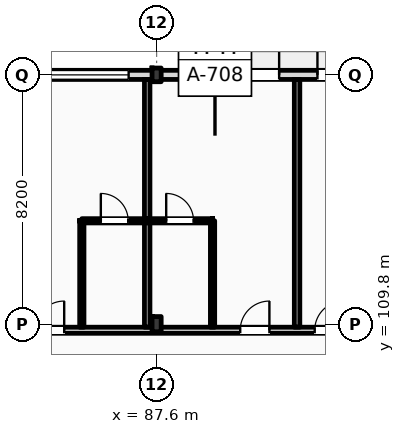
"""IFC4 building model, lengths in metres.
Left out: names, types, materials, properties, quantities, classifications, styles, units other than length and angle.
Written with IfcOpenShell. Run it as: python <this file> out.ifc"""

import sys

from ifc_helpers import new_model, si_unit, direction, frame, frame_2d, origin, origin_2d, place, context, subcontext, project, spatial, rectangle, i_section, extrude, element, fill, save


model = new_model("IFC4")
c1 = context("Model", 3, precision=1e-05, world=origin(), true_north=direction((0.0, 1.0)))
c2 = subcontext(c1, "Body", "Model", "MODEL_VIEW")
j1 = project(units=[si_unit("LENGTHUNIT", "METRE"), si_unit("PLANEANGLEUNIT", "RADIAN")], contexts=[c1])
p1 = place(None, origin())
s1 = spatial("IfcSite", under=j1, at=p1, CompositionType="ELEMENT")
p2 = place(p1, origin())
s2 = spatial("IfcBuilding", under=s1, at=p2, CompositionType="ELEMENT")
p3 = place(p2, frame((0.0, 0.0, 31.8)))
s3 = spatial("IfcBuildingStorey", under=s2, at=p3, CompositionType="ELEMENT", Elevation=31.8)
p4 = place(p3, frame((87.6, 109.8, 0.0), z_axis=(0.0, 0.0, 1.0), x_axis=(1.0, 0.0, 0.0)))
e1 = element("IfcColumn", 1, at=p4, inside=s3, PredefinedType="COLUMN", context=c2, shape_type="SweptSolid", body=[
    extrude(i_section(OverallWidth=0.3, OverallDepth=0.5, WebThickness=0.014, FlangeThickness=0.028, FilletRadius=0.027, at=origin_2d()), origin(), (0.0, 0.0, 1.0), 3.6),
])
p5 = place(p3, frame((87.6, 118.0, 0.0), z_axis=(0.0, 0.0, 1.0), x_axis=(1.0, 0.0, 0.0)))
e2 = element("IfcColumn", 2, at=p5, inside=s3, PredefinedType="COLUMN", context=c2, shape_type="SweptSolid", body=[
    extrude(i_section(OverallWidth=0.3, OverallDepth=0.45, WebThickness=0.014, FlangeThickness=0.026, FilletRadius=0.027, at=origin_2d()), origin(), (0.0, 0.0, 1.0), 3.6),
])
p6 = place(p3, frame((22.5, 118.0, 0.0), z_axis=(0.0, 0.0, 1.0), x_axis=(1.0, 0.0, 0.0)))
e3 = element("IfcWall", 3, at=p6, inside=s3, PredefinedType="STANDARD", context=c2, shape_type="SweptSolid", body=[
    extrude(rectangle(XDim=97.5, YDim=0.3, at=frame_2d((48.75, 0.0))), origin(), (0.0, 0.0, 1.0), 2.72),
])
p7 = place(p6, frame((3.61, 0.0, 0.9)))
e4 = element("IfcOpeningElement", 4, at=p7, cuts=e3, PredefinedType="OPENING", context=c2, shape_type="SweptSolid", body=[
    extrude(rectangle(XDim=1.1, YDim=1.64, at=frame_2d((0.55, 0.82))), frame((0.0, 0.16, 0.0), z_axis=(0.0, -1.0, 0.0), x_axis=(1.0, 0.0, 0.0)), (0.0, 0.0, 1.0), 0.32),
])
p8 = place(p6, frame((6.855, 0.0, 0.0)))
e5 = element("IfcOpeningElement", 5, at=p8, cuts=e3, PredefinedType="OPENING", context=c2, shape_type="SweptSolid", body=[
    extrude(rectangle(XDim=1.2, YDim=2.25, at=frame_2d((0.6, 1.125))), frame((0.0, 0.16, 0.0), z_axis=(0.0, -1.0, 0.0), x_axis=(1.0, 0.0, 0.0)), (0.0, 0.0, 1.0), 0.32),
])
p9 = place(p6, frame((11.405, 0.0, 0.9)))
e6 = element("IfcOpeningElement", 6, at=p9, cuts=e3, PredefinedType="OPENING", context=c2, shape_type="SweptSolid", body=[
    extrude(rectangle(XDim=2.1, YDim=1.64, at=frame_2d((1.05, 0.82))), frame((0.0, 0.16, 0.0), z_axis=(0.0, -1.0, 0.0), x_axis=(1.0, 0.0, 0.0)), (0.0, 0.0, 1.0), 0.32),
])
p10 = place(p6, frame((15.13, 0.0, 0.9)))
e7 = element("IfcOpeningElement", 7, at=p10, cuts=e3, PredefinedType="OPENING", context=c2, shape_type="SweptSolid", body=[
    extrude(rectangle(XDim=2.25, YDim=1.64, at=frame_2d((1.125, 0.82))), frame((0.0, 0.16, 0.0), z_axis=(0.0, -1.0, 0.0), x_axis=(1.0, 0.0, 0.0)), (0.0, 0.0, 1.0), 0.32),
])
p11 = place(p6, frame((21.53, 0.0, 0.0)))
e8 = element("IfcOpeningElement", 8, at=p11, cuts=e3, PredefinedType="OPENING", context=c2, shape_type="SweptSolid", body=[
    extrude(rectangle(XDim=1.2, YDim=2.25, at=frame_2d((0.6, 1.125))), frame((0.0, 0.16, 0.0), z_axis=(0.0, -1.0, 0.0), x_axis=(1.0, 0.0, 0.0)), (0.0, 0.0, 1.0), 0.32),
])
p12 = place(p6, frame((24.18, 0.0, 0.9)))
e9 = element("IfcOpeningElement", 9, at=p12, cuts=e3, PredefinedType="OPENING", context=c2, shape_type="SweptSolid", body=[
    extrude(rectangle(XDim=1.1, YDim=1.64, at=frame_2d((0.55, 0.82))), frame((0.0, 0.16, 0.0), z_axis=(0.0, -1.0, 0.0), x_axis=(1.0, 0.0, 0.0)), (0.0, 0.0, 1.0), 0.32),
])
p13 = place(p6, frame((29.105, 0.0, 0.9)))
e10 = element("IfcOpeningElement", 10, at=p13, cuts=e3, PredefinedType="OPENING", context=c2, shape_type="SweptSolid", body=[
    extrude(rectangle(XDim=2.7, YDim=1.64, at=frame_2d((1.35, 0.82))), frame((0.0, 0.16, 0.0), z_axis=(0.0, -1.0, 0.0), x_axis=(1.0, 0.0, 0.0)), (0.0, 0.0, 1.0), 0.32),
])
p14 = place(p6, frame((34.83, 0.0, 0.9)))
e11 = element("IfcOpeningElement", 11, at=p14, cuts=e3, PredefinedType="OPENING", context=c2, shape_type="SweptSolid", body=[
    extrude(rectangle(XDim=1.8, YDim=1.64, at=frame_2d((0.9, 0.82))), frame((0.0, 0.16, 0.0), z_axis=(0.0, -1.0, 0.0), x_axis=(1.0, 0.0, 0.0)), (0.0, 0.0, 1.0), 0.32),
])
p15 = place(p6, frame((38.525, 0.0, 0.0)))
e12 = element("IfcOpeningElement", 12, at=p15, cuts=e3, PredefinedType="OPENING", context=c2, shape_type="SweptSolid", body=[
    extrude(rectangle(XDim=1.2, YDim=2.25, at=frame_2d((0.6, 1.125))), frame((0.0, 0.16, 0.0), z_axis=(0.0, -1.0, 0.0), x_axis=(1.0, 0.0, 0.0)), (0.0, 0.0, 1.0), 0.32),
])
p16 = place(p6, frame((42.73, 0.0, 0.9)))
e13 = element("IfcOpeningElement", 13, at=p16, cuts=e3, PredefinedType="OPENING", context=c2, shape_type="SweptSolid", body=[
    extrude(rectangle(XDim=3.05, YDim=1.64, at=frame_2d((1.525, 0.82))), frame((0.0, 0.16, 0.0), z_axis=(0.0, -1.0, 0.0), x_axis=(1.0, 0.0, 0.0)), (0.0, 0.0, 1.0), 0.32),
])
p17 = place(p6, frame((47.155, 0.0, 0.9)))
e14 = element("IfcOpeningElement", 14, at=p17, cuts=e3, PredefinedType="OPENING", context=c2, shape_type="SweptSolid", body=[
    extrude(rectangle(XDim=1.35, YDim=1.64, at=frame_2d((0.675, 0.82))), frame((0.0, 0.16, 0.0), z_axis=(0.0, -1.0, 0.0), x_axis=(1.0, 0.0, 0.0)), (0.0, 0.0, 1.0), 0.32),
])
p18 = place(p6, frame((53.065, 0.0, 0.0)))
e15 = element("IfcOpeningElement", 15, at=p18, cuts=e3, PredefinedType="OPENING", context=c2, shape_type="SweptSolid", body=[
    extrude(rectangle(XDim=1.2, YDim=2.25, at=frame_2d((0.6, 1.125))), frame((0.0, 0.16, 0.0), z_axis=(0.0, -1.0, 0.0), x_axis=(1.0, 0.0, 0.0)), (0.0, 0.0, 1.0), 0.32),
])
p19 = place(p6, frame((58.2, 0.0, 0.9)))
e16 = element("IfcOpeningElement", 16, at=p19, cuts=e3, PredefinedType="OPENING", context=c2, shape_type="SweptSolid", body=[
    extrude(rectangle(XDim=1.8, YDim=1.64, at=frame_2d((0.9, 0.82))), frame((0.0, 0.16, 0.0), z_axis=(0.0, -1.0, 0.0), x_axis=(1.0, 0.0, 0.0)), (0.0, 0.0, 1.0), 0.32),
])
p20 = place(p6, frame((61.13, 0.0, 0.9)))
e17 = element("IfcOpeningElement", 17, at=p20, cuts=e3, PredefinedType="OPENING", context=c2, shape_type="SweptSolid", body=[
    extrude(rectangle(XDim=3.05, YDim=1.64, at=frame_2d((1.525, 0.82))), frame((0.0, 0.16, 0.0), z_axis=(0.0, -1.0, 0.0), x_axis=(1.0, 0.0, 0.0)), (0.0, 0.0, 1.0), 0.32),
])
p21 = place(p6, frame((67.93, 0.0, 0.0)))
e18 = element("IfcOpeningElement", 18, at=p21, cuts=e3, PredefinedType="OPENING", context=c2, shape_type="SweptSolid", body=[
    extrude(rectangle(XDim=1.2, YDim=2.25, at=frame_2d((0.6, 1.125))), frame((0.0, 0.16, 0.0), z_axis=(0.0, -1.0, 0.0), x_axis=(1.0, 0.0, 0.0)), (0.0, 0.0, 1.0), 0.32),
])
p22 = place(p6, frame((70.39, 0.0, 0.0)))
e19 = element("IfcOpeningElement", 19, at=p22, cuts=e3, PredefinedType="OPENING", context=c2, shape_type="SweptSolid", body=[
    extrude(rectangle(XDim=1.2, YDim=2.25, at=frame_2d((0.6, 1.125))), frame((0.0, 0.16, 0.0), z_axis=(0.0, -1.0, 0.0), x_axis=(1.0, 0.0, 0.0)), (0.0, 0.0, 1.0), 0.32),
])
p23 = place(p6, frame((75.905, 0.0, 0.9)))
e20 = element("IfcOpeningElement", 20, at=p23, cuts=e3, PredefinedType="OPENING", context=c2, shape_type="SweptSolid", body=[
    extrude(rectangle(XDim=1.1, YDim=1.5, at=frame_2d((0.55, 0.75))), frame((0.0, 0.16, 0.0), z_axis=(0.0, -1.0, 0.0), x_axis=(1.0, 0.0, 0.0)), (0.0, 0.0, 1.0), 0.32),
])
p24 = place(p6, frame((81.63, 0.0, 0.9)))
e21 = element("IfcOpeningElement", 21, at=p24, cuts=e3, PredefinedType="OPENING", context=c2, shape_type="SweptSolid", body=[
    extrude(rectangle(XDim=1.1, YDim=1.6, at=frame_2d((0.55, 0.8))), frame((0.0, 0.16, 0.0), z_axis=(0.0, -1.0, 0.0), x_axis=(1.0, 0.0, 0.0)), (0.0, 0.0, 1.0), 0.32),
])
p25 = place(p6, frame((84.955, 0.0, 0.9)))
e22 = element("IfcOpeningElement", 22, at=p25, cuts=e3, PredefinedType="OPENING", context=c2, shape_type="SweptSolid", body=[
    extrude(rectangle(XDim=1.4, YDim=1.64, at=frame_2d((0.7, 0.82))), frame((0.0, 0.16, 0.0), z_axis=(0.0, -1.0, 0.0), x_axis=(1.0, 0.0, 0.0)), (0.0, 0.0, 1.0), 0.32),
])
p26 = place(p6, frame((90.055, 0.0, 0.9)))
e23 = element("IfcOpeningElement", 23, at=p26, cuts=e3, PredefinedType="OPENING", context=c2, shape_type="SweptSolid", body=[
    extrude(rectangle(XDim=1.6, YDim=1.64, at=frame_2d((0.8, 0.82))), frame((0.0, 0.16, 0.0), z_axis=(0.0, -1.0, 0.0), x_axis=(1.0, 0.0, 0.0)), (0.0, 0.0, 1.0), 0.32),
])
p27 = place(p6, frame((93.87, 0.0, 0.9)))
e24 = element("IfcOpeningElement", 24, at=p27, cuts=e3, PredefinedType="OPENING", context=c2, shape_type="SweptSolid", body=[
    extrude(rectangle(XDim=1.75, YDim=1.64, at=frame_2d((0.875, 0.82))), frame((0.0, 0.16, 0.0), z_axis=(0.0, -1.0, 0.0), x_axis=(1.0, 0.0, 0.0)), (0.0, 0.0, 1.0), 0.32),
])
p28 = place(p3, frame((10.65, 109.6, 0.0), z_axis=(0.0, 0.0, 1.0), x_axis=(1.0, 0.0, 0.0)))
e25 = element("IfcWall", 25, at=p28, inside=s3, PredefinedType="PARTITIONING", context=c2, shape_type="SweptSolid", body=[
    extrude(rectangle(XDim=109.21, YDim=0.2, at=frame_2d((54.605, 0.0))), origin(), (0.0, 0.0, 1.0), 2.72),
])
p29 = place(p28, frame((15.825, 0.0, 0.0)))
e26 = element("IfcOpeningElement", 26, at=p29, cuts=e25, PredefinedType="OPENING", context=c2, shape_type="SweptSolid", body=[
    extrude(rectangle(XDim=1.02, YDim=2.2, at=frame_2d((0.51, 1.1))), frame((0.0, 0.11, 0.0), z_axis=(0.0, -1.0, 0.0), x_axis=(1.0, 0.0, 0.0)), (0.0, 0.0, 1.0), 0.22),
])
p30 = place(p28, frame((19.87, 0.0, 0.0)))
e27 = element("IfcOpeningElement", 27, at=p30, cuts=e25, PredefinedType="OPENING", context=c2, shape_type="SweptSolid", body=[
    extrude(rectangle(XDim=1.02, YDim=2.2, at=frame_2d((0.51, 1.1))), frame((0.0, 0.11, 0.0), z_axis=(0.0, -1.0, 0.0), x_axis=(1.0, 0.0, 0.0)), (0.0, 0.0, 1.0), 0.22),
])
p31 = place(p28, frame((24.47, 0.0, 0.0)))
e28 = element("IfcOpeningElement", 28, at=p31, cuts=e25, PredefinedType="OPENING", context=c2, shape_type="SweptSolid", body=[
    extrude(rectangle(XDim=1.02, YDim=2.2, at=frame_2d((0.51, 1.1))), frame((0.0, 0.11, 0.0), z_axis=(0.0, -1.0, 0.0), x_axis=(1.0, 0.0, 0.0)), (0.0, 0.0, 1.0), 0.22),
])
p32 = place(p28, frame((26.92, 0.0, 0.0)))
e29 = element("IfcOpeningElement", 29, at=p32, cuts=e25, PredefinedType="OPENING", context=c2, shape_type="SweptSolid", body=[
    extrude(rectangle(XDim=1.02, YDim=2.2, at=frame_2d((0.51, 1.1))), frame((0.0, 0.11, 0.0), z_axis=(0.0, -1.0, 0.0), x_axis=(1.0, 0.0, 0.0)), (0.0, 0.0, 1.0), 0.22),
])
p33 = place(p28, frame((33.7, 0.0, 0.0)))
e30 = element("IfcOpeningElement", 30, at=p33, cuts=e25, PredefinedType="OPENING", context=c2, shape_type="SweptSolid", body=[
    extrude(rectangle(XDim=0.96, YDim=2.2, at=frame_2d((0.48, 1.1))), frame((0.0, 0.11, 0.0), z_axis=(0.0, -1.0, 0.0), x_axis=(1.0, 0.0, 0.0)), (0.0, 0.0, 1.0), 0.22),
])
p34 = place(p28, frame((35.9, 0.0, 0.0)))
e31 = element("IfcOpeningElement", 31, at=p34, cuts=e25, PredefinedType="OPENING", context=c2, shape_type="SweptSolid", body=[
    extrude(rectangle(XDim=0.96, YDim=2.2, at=frame_2d((0.48, 1.1))), frame((0.0, 0.11, 0.0), z_axis=(0.0, -1.0, 0.0), x_axis=(1.0, 0.0, 0.0)), (0.0, 0.0, 1.0), 0.22),
])
p35 = place(p28, frame((42.9, 0.0, 0.0)))
e32 = element("IfcOpeningElement", 32, at=p35, cuts=e25, PredefinedType="OPENING", context=c2, shape_type="SweptSolid", body=[
    extrude(rectangle(XDim=0.96, YDim=2.2, at=frame_2d((0.48, 1.1))), frame((0.0, 0.11, 0.0), z_axis=(0.0, -1.0, 0.0), x_axis=(1.0, 0.0, 0.0)), (0.0, 0.0, 1.0), 0.22),
])
p36 = place(p28, frame((47.5, 0.0, 0.0)))
e33 = element("IfcOpeningElement", 33, at=p36, cuts=e25, PredefinedType="OPENING", context=c2, shape_type="SweptSolid", body=[
    extrude(rectangle(XDim=0.96, YDim=2.2, at=frame_2d((0.48, 1.1))), frame((0.0, 0.11, 0.0), z_axis=(0.0, -1.0, 0.0), x_axis=(1.0, 0.0, 0.0)), (0.0, 0.0, 1.0), 0.22),
])
p37 = place(p28, frame((49.95, 0.0, 0.0)))
e34 = element("IfcOpeningElement", 34, at=p37, cuts=e25, PredefinedType="OPENING", context=c2, shape_type="SweptSolid", body=[
    extrude(rectangle(XDim=0.96, YDim=2.2, at=frame_2d((0.48, 1.1))), frame((0.0, 0.11, 0.0), z_axis=(0.0, -1.0, 0.0), x_axis=(1.0, 0.0, 0.0)), (0.0, 0.0, 1.0), 0.22),
])
p38 = place(p28, frame((56.7, 0.0, 0.0)))
e35 = element("IfcOpeningElement", 35, at=p38, cuts=e25, PredefinedType="OPENING", context=c2, shape_type="SweptSolid", body=[
    extrude(rectangle(XDim=0.96, YDim=2.2, at=frame_2d((0.48, 1.1))), frame((0.0, 0.11, 0.0), z_axis=(0.0, -1.0, 0.0), x_axis=(1.0, 0.0, 0.0)), (0.0, 0.0, 1.0), 0.22),
])
p39 = place(p28, frame((59.15, 0.0, 0.0)))
e36 = element("IfcOpeningElement", 36, at=p39, cuts=e25, PredefinedType="OPENING", context=c2, shape_type="SweptSolid", body=[
    extrude(rectangle(XDim=0.96, YDim=2.2, at=frame_2d((0.48, 1.1))), frame((0.0, 0.11, 0.0), z_axis=(0.0, -1.0, 0.0), x_axis=(1.0, 0.0, 0.0)), (0.0, 0.0, 1.0), 0.22),
])
p40 = place(p28, frame((65.9, 0.0, 0.0)))
e37 = element("IfcOpeningElement", 37, at=p40, cuts=e25, PredefinedType="OPENING", context=c2, shape_type="SweptSolid", body=[
    extrude(rectangle(XDim=0.96, YDim=2.2, at=frame_2d((0.48, 1.1))), frame((0.0, 0.11, 0.0), z_axis=(0.0, -1.0, 0.0), x_axis=(1.0, 0.0, 0.0)), (0.0, 0.0, 1.0), 0.22),
])
p41 = place(p28, frame((70.5, 0.0, 0.0)))
e38 = element("IfcOpeningElement", 38, at=p41, cuts=e25, PredefinedType="OPENING", context=c2, shape_type="SweptSolid", body=[
    extrude(rectangle(XDim=0.96, YDim=2.2, at=frame_2d((0.48, 1.1))), frame((0.0, 0.11, 0.0), z_axis=(0.0, -1.0, 0.0), x_axis=(1.0, 0.0, 0.0)), (0.0, 0.0, 1.0), 0.22),
])
p42 = place(p28, frame((72.95, 0.0, 0.0)))
e39 = element("IfcOpeningElement", 39, at=p42, cuts=e25, PredefinedType="OPENING", context=c2, shape_type="SweptSolid", body=[
    extrude(rectangle(XDim=0.96, YDim=2.2, at=frame_2d((0.48, 1.1))), frame((0.0, 0.11, 0.0), z_axis=(0.0, -1.0, 0.0), x_axis=(1.0, 0.0, 0.0)), (0.0, 0.0, 1.0), 0.22),
])
p43 = place(p28, frame((79.7, 0.0, 0.0)))
e40 = element("IfcOpeningElement", 40, at=p43, cuts=e25, PredefinedType="OPENING", context=c2, shape_type="SweptSolid", body=[
    extrude(rectangle(XDim=0.96, YDim=2.2, at=frame_2d((0.48, 1.1))), frame((0.0, 0.11, 0.0), z_axis=(0.0, -1.0, 0.0), x_axis=(1.0, 0.0, 0.0)), (0.0, 0.0, 1.0), 0.22),
])
p44 = place(p28, frame((82.15, 0.0, 0.0)))
e41 = element("IfcOpeningElement", 41, at=p44, cuts=e25, PredefinedType="OPENING", context=c2, shape_type="SweptSolid", body=[
    extrude(rectangle(XDim=0.96, YDim=2.2, at=frame_2d((0.48, 1.1))), frame((0.0, 0.11, 0.0), z_axis=(0.0, -1.0, 0.0), x_axis=(1.0, 0.0, 0.0)), (0.0, 0.0, 1.0), 0.22),
])
p45 = place(p28, frame((88.9, 0.0, 0.0)))
e42 = element("IfcOpeningElement", 42, at=p45, cuts=e25, PredefinedType="OPENING", context=c2, shape_type="SweptSolid", body=[
    extrude(rectangle(XDim=0.96, YDim=2.2, at=frame_2d((0.48, 1.1))), frame((0.0, 0.11, 0.0), z_axis=(0.0, -1.0, 0.0), x_axis=(1.0, 0.0, 0.0)), (0.0, 0.0, 1.0), 0.22),
])
p46 = place(p28, frame((93.75, 0.0, 0.0)))
e43 = element("IfcOpeningElement", 43, at=p46, cuts=e25, PredefinedType="OPENING", context=c2, shape_type="SweptSolid", body=[
    extrude(rectangle(XDim=0.96, YDim=2.2, at=frame_2d((0.48, 1.1))), frame((0.0, 0.11, 0.0), z_axis=(0.0, -1.0, 0.0), x_axis=(1.0, 0.0, 0.0)), (0.0, 0.0, 1.0), 0.22),
])
p47 = place(p28, frame((98.1, 0.0, 0.0)))
e44 = element("IfcOpeningElement", 44, at=p47, cuts=e25, PredefinedType="OPENING", context=c2, shape_type="SweptSolid", body=[
    extrude(rectangle(XDim=0.96, YDim=2.2, at=frame_2d((0.48, 1.1))), frame((0.0, 0.11, 0.0), z_axis=(0.0, -1.0, 0.0), x_axis=(1.0, 0.0, 0.0)), (0.0, 0.0, 1.0), 0.22),
])
p48 = place(p28, frame((102.7, 0.0, 0.0)))
e45 = element("IfcOpeningElement", 45, at=p48, cuts=e25, PredefinedType="OPENING", context=c2, shape_type="SweptSolid", body=[
    extrude(rectangle(XDim=0.96, YDim=2.2, at=frame_2d((0.48, 1.1))), frame((0.0, 0.11, 0.0), z_axis=(0.0, -1.0, 0.0), x_axis=(1.0, 0.0, 0.0)), (0.0, 0.0, 1.0), 0.22),
])
p49 = place(p28, frame((105.04, 0.0, 0.0)))
e46 = element("IfcOpeningElement", 46, at=p49, cuts=e25, PredefinedType="OPENING", context=c2, shape_type="SweptSolid", body=[
    extrude(rectangle(XDim=0.96, YDim=2.2, at=frame_2d((0.48, 1.1))), frame((0.0, 0.11, 0.0), z_axis=(0.0, -1.0, 0.0), x_axis=(1.0, 0.0, 0.0)), (0.0, 0.0, 1.0), 0.22),
])
p50 = place(p28, frame((2.716, 0.0, 0.0)))
e47 = element("IfcOpeningElement", 47, at=p50, cuts=e25, PredefinedType="OPENING", context=c2, shape_type="SweptSolid", body=[
    extrude(rectangle(XDim=1.35, YDim=2.25, at=frame_2d((0.675, 1.125))), frame((0.0, 0.11, 0.0), z_axis=(0.0, -1.0, 0.0), x_axis=(1.0, 0.0, 0.0)), (0.0, 0.0, 1.0), 0.22),
])
p51 = place(p28, frame((6.65, 0.0, 0.0)))
e48 = element("IfcOpeningElement", 48, at=p51, cuts=e25, PredefinedType="OPENING", context=c2, shape_type="SweptSolid", body=[
    extrude(rectangle(XDim=1.35, YDim=2.25, at=frame_2d((0.675, 1.125))), frame((0.0, 0.11, 0.0), z_axis=(0.0, -1.0, 0.0), x_axis=(1.0, 0.0, 0.0)), (0.0, 0.0, 1.0), 0.22),
])
p52 = place(p28, frame((10.583, 0.0, 0.0)))
e49 = element("IfcOpeningElement", 49, at=p52, cuts=e25, PredefinedType="OPENING", context=c2, shape_type="SweptSolid", body=[
    extrude(rectangle(XDim=1.35, YDim=2.25, at=frame_2d((0.675, 1.125))), frame((0.0, 0.11, 0.0), z_axis=(0.0, -1.0, 0.0), x_axis=(1.0, 0.0, 0.0)), (0.0, 0.0, 1.0), 0.22),
])
p53 = place(p3, frame((87.29, 109.7, 0.0), z_axis=(0.0, 0.0, 1.0), x_axis=(0.0, 1.0, 0.0)))
e50 = element("IfcWall", 50, at=p53, inside=s3, PredefinedType="PARTITIONING", context=c2, shape_type="SweptSolid", body=[
    extrude(rectangle(XDim=8.15, YDim=0.18, at=frame_2d((4.075, 0.0))), origin(), (0.0, 0.0, 1.0), 3.36),
])
p54 = place(p3, frame((85.14, 109.7, 0.0), z_axis=(0.0, 0.0, 1.0), x_axis=(0.0, 1.0, 0.0)))
e51 = element("IfcWall", 51, at=p54, inside=s3, PredefinedType="PARTITIONING", context=c2, shape_type="SweptSolid", body=[
    extrude(rectangle(XDim=3.5, YDim=0.14, at=frame_2d((1.75, 0.0))), origin(), (0.0, 0.0, 1.0), 3.05),
])
p55 = place(p3, frame((85.14, 113.2, 0.0), z_axis=(0.0, 0.0, 1.0), x_axis=(1.0, 0.0, 0.0)))
e52 = element("IfcWall", 52, at=p55, inside=s3, PredefinedType="PARTITIONING", context=c2, shape_type="SweptSolid", body=[
    extrude(rectangle(XDim=2.15, YDim=0.14, at=frame_2d((1.075, 0.0))), origin(), (0.0, 0.0, 1.0), 3.36),
])
p56 = place(p55, frame((0.625, 0.0, 0.0)))
e53 = element("IfcOpeningElement", 53, at=p56, cuts=e52, PredefinedType="OPENING", context=c2, shape_type="SweptSolid", body=[
    extrude(rectangle(XDim=0.9, YDim=2.1, at=frame_2d((0.45, 1.05))), frame((0.0, 0.08, 0.0), z_axis=(0.0, -1.0, 0.0), x_axis=(1.0, 0.0, 0.0)), (0.0, 0.0, 1.0), 0.16),
])
p57 = place(p3, frame((92.22, 109.7, 0.0), z_axis=(0.0, 0.0, 1.0), x_axis=(0.0, 1.0, 0.0)))
e54 = element("IfcWall", 54, at=p57, inside=s3, PredefinedType="PARTITIONING", context=c2, shape_type="SweptSolid", body=[
    extrude(rectangle(XDim=8.15, YDim=0.18, at=frame_2d((4.075, 0.0))), origin(), (0.0, 0.0, 1.0), 3.36),
])
p58 = place(p3, frame((89.44, 109.7, 0.0), z_axis=(0.0, 0.0, 1.0), x_axis=(0.0, 1.0, 0.0)))
e55 = element("IfcWall", 55, at=p58, inside=s3, PredefinedType="PARTITIONING", context=c2, shape_type="SweptSolid", body=[
    extrude(rectangle(XDim=3.5, YDim=0.14, at=frame_2d((1.75, 0.0))), origin(), (0.0, 0.0, 1.0), 3.36),
])
p59 = place(p3, frame((87.29, 113.2, 0.0), z_axis=(0.0, 0.0, 1.0), x_axis=(1.0, 0.0, 0.0)))
e56 = element("IfcWall", 56, at=p59, inside=s3, PredefinedType="PARTITIONING", context=c2, shape_type="SweptSolid", body=[
    extrude(rectangle(XDim=2.15, YDim=0.14, at=frame_2d((1.075, 0.0))), origin(), (0.0, 0.0, 1.0), 3.36),
])
p60 = place(p59, frame((0.625, 0.0, 0.0)))
e57 = element("IfcOpeningElement", 57, at=p60, cuts=e56, PredefinedType="OPENING", context=c2, shape_type="SweptSolid", body=[
    extrude(rectangle(XDim=0.9, YDim=2.1, at=frame_2d((0.45, 1.05))), frame((0.0, 0.08, 0.0), z_axis=(0.0, -1.0, 0.0), x_axis=(1.0, 0.0, 0.0)), (0.0, 0.0, 1.0), 0.16),
])
p61 = place(p20, origin())
e58 = element("IfcWindow", 58, at=p61, inside=s3, PartitioningType="DOUBLE_PANEL_VERTICAL", PredefinedType="WINDOW", context=c2, shape_type="SweptSolid", body=[
    extrude(rectangle(XDim=3.05, YDim=1.64, at=frame_2d((1.525, 0.82))), frame((0.0, 0.03, 0.0), z_axis=(0.0, -1.0, 0.0), x_axis=(1.0, 0.0, 0.0)), (0.0, 0.0, 1.0), 0.06),
])
fill(e17, e58)
p62 = place(p21, origin())
e59 = element("IfcDoor", 59, at=p62, inside=s3, OperationType="SINGLE_SWING_RIGHT", PredefinedType="DOOR", context=c2, shape_type="SweptSolid", body=[
    extrude(rectangle(XDim=1.2, YDim=2.25, at=frame_2d((0.6, 1.125))), frame((0.0, 0.025, 0.0), z_axis=(0.0, -1.0, 0.0), x_axis=(1.0, 0.0, 0.0)), (0.0, 0.0, 1.0), 0.05),
])
fill(e18, e59)
p63 = place(p22, origin())
e60 = element("IfcDoor", 60, at=p63, inside=s3, OperationType="SINGLE_SWING_LEFT", PredefinedType="DOOR", context=c2, shape_type="SweptSolid", body=[
    extrude(rectangle(XDim=1.2, YDim=2.25, at=frame_2d((0.6, 1.125))), frame((0.0, 0.025, 0.0), z_axis=(0.0, -1.0, 0.0), x_axis=(1.0, 0.0, 0.0)), (0.0, 0.0, 1.0), 0.05),
])
fill(e19, e60)
p64 = place(p42, origin())
e61 = element("IfcDoor", 61, at=p64, inside=s3, OperationType="SINGLE_SWING_RIGHT", PredefinedType="DOOR", context=c2, shape_type="SweptSolid", body=[
    extrude(rectangle(XDim=0.96, YDim=2.2, at=frame_2d((0.48, 1.1))), frame((0.0, 0.025, 0.0), z_axis=(0.0, -1.0, 0.0), x_axis=(1.0, 0.0, 0.0)), (0.0, 0.0, 1.0), 0.05),
])
fill(e39, e61)
p65 = place(p56, origin())
e62 = element("IfcDoor", 62, at=p65, inside=s3, OperationType="SINGLE_SWING_LEFT", PredefinedType="DOOR", context=c2, shape_type="SweptSolid", body=[
    extrude(rectangle(XDim=0.9, YDim=2.1, at=frame_2d((0.45, 1.05))), frame((0.0, 0.025, 0.0), z_axis=(0.0, -1.0, 0.0), x_axis=(1.0, 0.0, 0.0)), (0.0, 0.0, 1.0), 0.05),
])
fill(e53, e62)
p66 = place(p43, origin())
e63 = element("IfcDoor", 63, at=p66, inside=s3, OperationType="SINGLE_SWING_RIGHT", PredefinedType="DOOR", context=c2, shape_type="SweptSolid", body=[
    extrude(rectangle(XDim=0.96, YDim=2.2, at=frame_2d((0.48, 1.1))), frame((0.0, 0.025, 0.0), z_axis=(0.0, -1.0, 0.0), x_axis=(1.0, 0.0, 0.0)), (0.0, 0.0, 1.0), 0.05),
])
fill(e40, e63)
p67 = place(p60, origin())
e64 = element("IfcDoor", 64, at=p67, inside=s3, OperationType="SINGLE_SWING_LEFT", PredefinedType="DOOR", context=c2, shape_type="SweptSolid", body=[
    extrude(rectangle(XDim=0.9, YDim=2.1, at=frame_2d((0.45, 1.05))), frame((0.0, 0.025, 0.0), z_axis=(0.0, -1.0, 0.0), x_axis=(1.0, 0.0, 0.0)), (0.0, 0.0, 1.0), 0.05),
])
fill(e57, e64)
p68 = place(p44, origin())
e65 = element("IfcDoor", 65, at=p68, inside=s3, OperationType="SINGLE_SWING_RIGHT", PredefinedType="DOOR", context=c2, shape_type="SweptSolid", body=[
    extrude(rectangle(XDim=0.96, YDim=2.2, at=frame_2d((0.48, 1.1))), frame((0.0, 0.025, 0.0), z_axis=(0.0, -1.0, 0.0), x_axis=(1.0, 0.0, 0.0)), (0.0, 0.0, 1.0), 0.05),
])
fill(e41, e65)
save(model, sys.argv[1])
